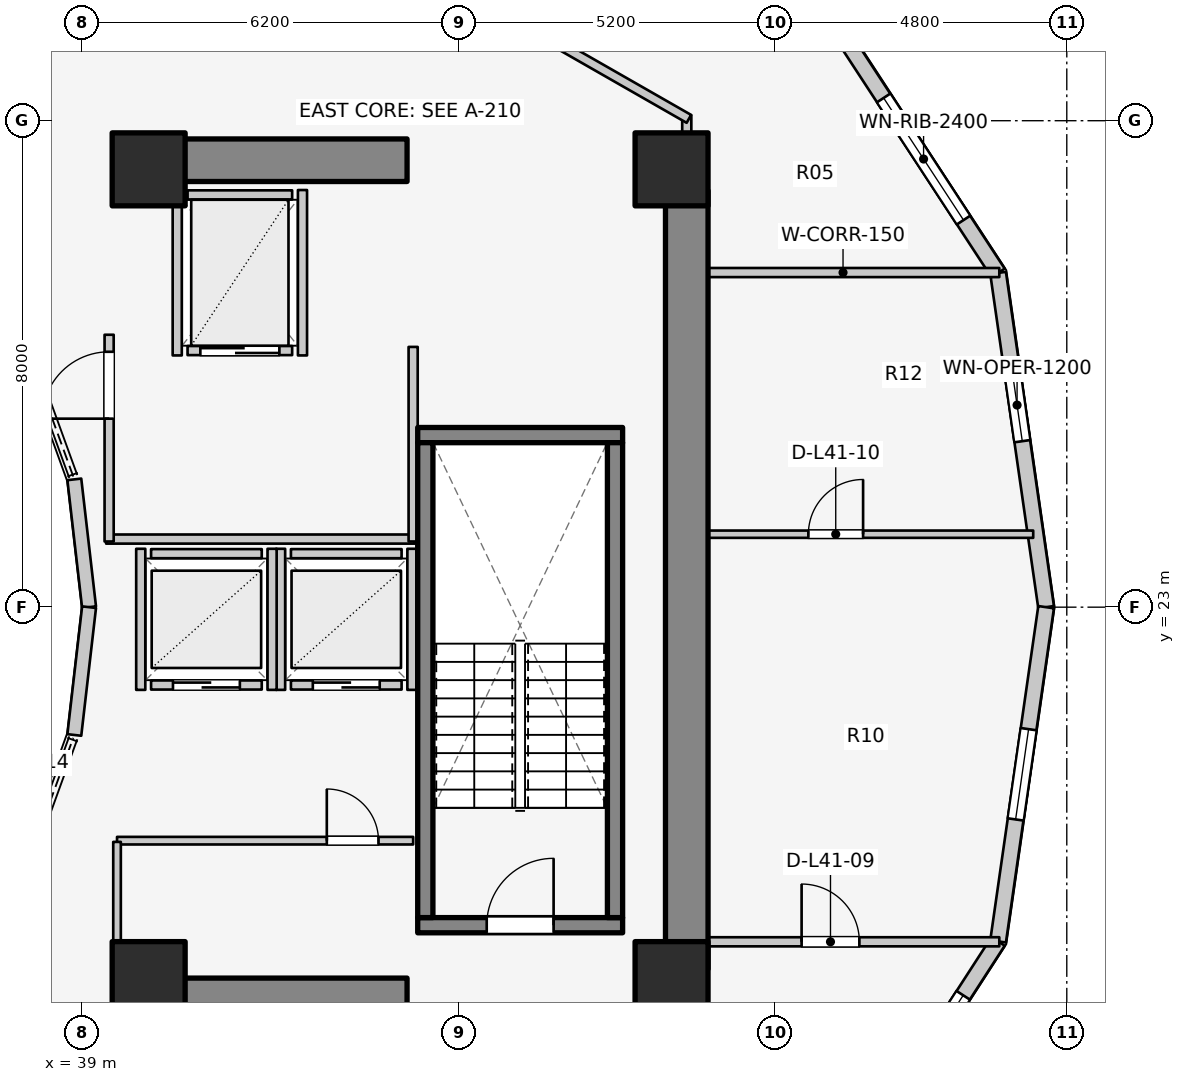
"""IFC4 building model, lengths in metres.
Left out: names, types, materials, properties, quantities, classifications, styles, units other than length and angle.
Written with IfcOpenShell. Run it as: python <this file> out.ifc"""

import sys

from ifc_helpers import new_model, si_unit, direction, frame, frame_2d, origin, origin_2d, place, context, subcontext, project, spatial, rectangle, extrude, element, fill, save


model = new_model("IFC4")
c1 = context("Model", 3, precision=1e-05, world=origin(), true_north=direction((0.0, 1.0)))
c2 = subcontext(c1, "Body", "Model", "MODEL_VIEW")
j1 = project(units=[si_unit("LENGTHUNIT", "METRE"), si_unit("PLANEANGLEUNIT", "RADIAN")], contexts=[c1])
p1 = place(None, origin())
s1 = spatial("IfcSite", under=j1, at=p1, CompositionType="ELEMENT")
p2 = place(p1, origin())
s2 = spatial("IfcBuilding", under=s1, at=p2, CompositionType="ELEMENT")
p3 = place(p2, frame((0.0, 0.0, 137.4)))
s3 = spatial("IfcBuildingStorey", under=s2, at=p3, CompositionType="ELEMENT", Elevation=137.4)
p4 = place(p3, frame((48.95, 17.05, 0.0), z_axis=(0.0, 0.0, 1.0), x_axis=(0.0, 1.0, 0.0)))
e1 = element("IfcWall", 1, at=p4, inside=s3, PredefinedType="SHEAR", context=c2, shape_type="SweptSolid", body=[
    extrude(rectangle(XDim=12.8, YDim=0.7, at=frame_2d((6.4, 0.0))), origin(), (0.0, 0.0, 1.0), 3.1),
])
for number, where, z_axis, x_axis in (
    (2, (39.85, 16.55, 0.0), (0.0, 0.0, 1.0), (1.0, 0.0, 0.0)),
    (3, (39.85, 30.35, 0.0), (0.0, 0.0, 1.0), (1.0, 0.0, 0.0)),
):
    element("IfcWall", number, at=place(p3, frame(where, z_axis=z_axis, x_axis=x_axis)), inside=s3, PredefinedType="SHEAR", context=c2, shape_type="SweptSolid", body=[
        extrude(rectangle(XDim=4.5, YDim=0.7, at=frame_2d((2.25, 0.0))), origin(), (0.0, 0.0, 1.0), 3.1),
    ])
p5 = place(p3, frame((44.525, 17.77, 0.0), z_axis=(0.0, 0.0, 1.0), x_axis=(1.0, 0.0, 0.0)))
e4 = element("IfcWall", 4, at=p5, inside=s3, PredefinedType="SOLIDWALL", context=c2, shape_type="SweptSolid", body=[
    extrude(rectangle(XDim=3.37, YDim=0.25, at=frame_2d((1.685, 0.0))), origin(), (0.0, 0.0, 1.0), 3.1),
])
p6 = place(p5, frame((1.135, 0.0, 0.0)))
e5 = element("IfcOpeningElement", 5, at=p6, cuts=e4, PredefinedType="OPENING", context=c2, shape_type="SweptSolid", body=[
    extrude(rectangle(XDim=1.1, YDim=2.1, at=frame_2d((0.55, 1.05))), frame((0.0, 0.135, 0.0), z_axis=(0.0, -1.0, 0.0), x_axis=(1.0, 0.0, 0.0)), (0.0, 0.0, 1.0), 0.27),
])
p7 = place(p3, frame((44.525, 25.83, 0.0), z_axis=(0.0, 0.0, 1.0), x_axis=(1.0, 0.0, 0.0)))
e6 = element("IfcWall", 6, at=p7, inside=s3, PredefinedType="SOLIDWALL", context=c2, shape_type="SweptSolid", body=[
    extrude(rectangle(XDim=3.37, YDim=0.25, at=frame_2d((1.685, 0.0))), origin(), (0.0, 0.0, 1.0), 3.1),
])
for number, where, z_axis, x_axis in (
    (7, (44.65, 17.895, 0.0), (0.0, 0.0, 1.0), (0.0, 1.0, 0.0)),
    (8, (47.77, 17.895, 0.0), (0.0, 0.0, 1.0), (0.0, 1.0, 0.0)),
):
    element("IfcWall", number, at=place(p3, frame(where, z_axis=z_axis, x_axis=x_axis)), inside=s3, PredefinedType="SOLIDWALL", context=c2, shape_type="SweptSolid", body=[
        extrude(rectangle(XDim=7.81, YDim=0.25, at=frame_2d((3.905, 0.0))), origin(), (0.0, 0.0, 1.0), 3.1),
    ])
for number, where, z_axis, x_axis in (
    (9, (40.1, 16.9, 0.0), (0.0, 0.0, 1.0), (1.0, 0.0, 0.0)),
    (10, (48.7, 16.9, 0.0), (0.0, 0.0, 1.0), (1.0, 0.0, 0.0)),
    (11, (48.7, 30.2, 0.0), (0.0, 0.0, 1.0), (1.0, 0.0, 0.0)),
    (12, (40.1, 30.2, 0.0), (0.0, 0.0, 1.0), (1.0, 0.0, 0.0)),
):
    element("IfcColumn", number, at=place(p3, frame(where, z_axis=z_axis, x_axis=x_axis)), inside=s3, PredefinedType="COLUMN", context=c2, shape_type="SweptSolid", body=[
        extrude(rectangle(XDim=1.2, YDim=1.2, at=origin_2d()), origin(), (0.0, 0.0, 1.0), 3.1),
    ])
for number, where, z_axis, x_axis in (
    (13, (39.12, 23.0, 0.0), (0.0, 0.0, 1.0), (-0.115, 0.993, 0.0)),
    (14, (38.877, 20.898, 0.0), (0.0, 0.0, 1.0), (0.115, 0.993, 0.0)),
):
    element("IfcWall", number, at=place(p3, frame(where, z_axis=z_axis, x_axis=x_axis)), inside=s3, PredefinedType="STANDARD", context=c2, shape_type="SweptSolid", body=[
        extrude(rectangle(XDim=2.115, YDim=0.23, at=frame_2d((1.058, 0.0))), origin(), (0.0, 0.0, 1.0), 2.84),
    ])
p8 = place(p3, frame((54.86, 23.0, 0.0), z_axis=(0.0, 0.0, 1.0), x_axis=(-0.142227632286, 0.989833976288, 0.0)))
e15 = element("IfcWall", 15, at=p8, inside=s3, PredefinedType="STANDARD", context=c2, shape_type="SweptSolid", body=[
    extrude(rectangle(XDim=5.553, YDim=0.26, at=frame_2d((2.776, 0.0))), origin(), (0.0, 0.0, 1.0), 2.85),
])
p9 = place(p8, frame((2.758, 0.0, 0.75)))
e16 = element("IfcOpeningElement", 16, at=p9, cuts=e15, PredefinedType="OPENING", context=c2, shape_type="SweptSolid", body=[
    extrude(rectangle(XDim=1.2, YDim=1.5, at=frame_2d((0.6, 0.75))), frame((0.0, 0.14, 0.0), z_axis=(0.0, -1.0, 0.0), x_axis=(1.0, 0.0, 0.0)), (0.0, 0.0, 1.0), 0.28),
])
p10 = place(p3, frame((54.07, 28.497, 0.0), z_axis=(0.0, 0.0, 1.0), x_axis=(-0.547456494366, 0.836834145322, 0.0)))
e17 = element("IfcWall", 17, at=p10, inside=s3, PredefinedType="STANDARD", context=c2, shape_type="SweptSolid", body=[
    extrude(rectangle(XDim=4.477, YDim=0.26, at=frame_2d((2.239, 0.0))), origin(), (0.0, 0.0, 1.0), 2.85),
])
p11 = place(p10, frame((1.039, 0.0, 0.75)))
e18 = element("IfcOpeningElement", 18, at=p11, cuts=e17, PredefinedType="OPENING", context=c2, shape_type="SweptSolid", body=[
    extrude(rectangle(XDim=2.4, YDim=1.7, at=frame_2d((1.2, 0.85))), frame((0.0, 0.14, 0.0), z_axis=(0.0, -1.0, 0.0), x_axis=(1.0, 0.0, 0.0)), (0.0, 0.0, 1.0), 0.28),
])
p12 = place(p3, frame((51.619, 13.716, 0.0), z_axis=(0.0, 0.0, 1.0), x_axis=(0.543358984534, 0.839500454989, 0.0)))
e19 = element("IfcWall", 19, at=p12, inside=s3, PredefinedType="STANDARD", context=c2, shape_type="SweptSolid", body=[
    extrude(rectangle(XDim=4.511, YDim=0.26, at=frame_2d((2.256, 0.0))), origin(), (0.0, 0.0, 1.0), 2.85),
])
p13 = place(p12, frame((1.056, 0.0, 0.75)))
e20 = element("IfcOpeningElement", 20, at=p13, cuts=e19, PredefinedType="OPENING", context=c2, shape_type="SweptSolid", body=[
    extrude(rectangle(XDim=2.4, YDim=1.7, at=frame_2d((1.2, 0.85))), frame((0.0, 0.14, 0.0), z_axis=(0.0, -1.0, 0.0), x_axis=(1.0, 0.0, 0.0)), (0.0, 0.0, 1.0), 0.28),
])
p14 = place(p3, frame((54.07, 17.503, 0.0), z_axis=(0.0, 0.0, 1.0), x_axis=(0.142227632286, 0.989833976288, 0.0)))
e21 = element("IfcWall", 21, at=p14, inside=s3, PredefinedType="STANDARD", context=c2, shape_type="SweptSolid", body=[
    extrude(rectangle(XDim=5.553, YDim=0.26, at=frame_2d((2.776, 0.0))), origin(), (0.0, 0.0, 1.0), 2.85),
])
p15 = place(p14, frame((2.027, 0.0, 0.75)))
e22 = element("IfcOpeningElement", 22, at=p15, cuts=e21, PredefinedType="OPENING", context=c2, shape_type="SweptSolid", body=[
    extrude(rectangle(XDim=1.5, YDim=1.6, at=frame_2d((0.75, 0.8))), frame((0.0, 0.14, 0.0), z_axis=(0.0, -1.0, 0.0), x_axis=(1.0, 0.0, 0.0)), (0.0, 0.0, 1.0), 0.28),
])
p16 = place(p3, frame((42.44, 21.72, 0.0), z_axis=(0.0, 0.0, 1.0), x_axis=(1.0, 0.0, 0.0)))
e23 = element("IfcWall", 23, at=p16, inside=s3, PredefinedType="SOLIDWALL", context=c2, shape_type="SweptSolid", body=[
    extrude(rectangle(XDim=1.82, YDim=0.15, at=frame_2d((0.91, 0.0))), origin(), (0.0, 0.0, 1.0), 2.855),
])
p17 = place(p16, frame((0.36, 0.0, 0.0)))
e24 = element("IfcOpeningElement", 24, at=p17, cuts=e23, PredefinedType="OPENING", context=c2, shape_type="SweptSolid", body=[
    extrude(rectangle(XDim=1.1, YDim=2.1, at=frame_2d((0.55, 1.05))), frame((0.0, 0.085, 0.0), z_axis=(0.0, -1.0, 0.0), x_axis=(1.0, 0.0, 0.0)), (0.0, 0.0, 1.0), 0.17),
])
p18 = place(p3, frame((42.44, 23.88, 0.0), z_axis=(0.0, 0.0, 1.0), x_axis=(1.0, 0.0, 0.0)))
e25 = element("IfcWall", 25, at=p18, inside=s3, PredefinedType="SOLIDWALL", context=c2, shape_type="SweptSolid", body=[
    extrude(rectangle(XDim=1.82, YDim=0.15, at=frame_2d((0.91, 0.0))), origin(), (0.0, 0.0, 1.0), 2.855),
])
for number, where, z_axis, x_axis in (
    (26, (42.27, 21.64, 0.0), (0.0, 0.0, 1.0), (0.0, 1.0, 0.0)),
    (27, (44.43, 21.64, 0.0), (0.0, 0.0, 1.0), (0.0, 1.0, 0.0)),
):
    element("IfcWall", number, at=place(p3, frame(where, z_axis=z_axis, x_axis=x_axis)), inside=s3, PredefinedType="SOLIDWALL", context=c2, shape_type="SweptSolid", body=[
        extrude(rectangle(XDim=2.32, YDim=0.15, at=frame_2d((1.16, 0.0))), origin(), (0.0, 0.0, 1.0), 2.855),
    ])
p19 = place(p3, frame((40.14, 21.72, 0.0), z_axis=(0.0, 0.0, 1.0), x_axis=(1.0, 0.0, 0.0)))
e28 = element("IfcWall", 28, at=p19, inside=s3, PredefinedType="SOLIDWALL", context=c2, shape_type="SweptSolid", body=[
    extrude(rectangle(XDim=1.82, YDim=0.15, at=frame_2d((0.91, 0.0))), origin(), (0.0, 0.0, 1.0), 2.12),
])
p20 = place(p19, frame((0.36, 0.0, 0.0)))
e29 = element("IfcOpeningElement", 29, at=p20, cuts=e28, PredefinedType="OPENING", context=c2, shape_type="SweptSolid", body=[
    extrude(rectangle(XDim=1.1, YDim=2.1, at=frame_2d((0.55, 1.05))), frame((0.0, 0.085, 0.0), z_axis=(0.0, -1.0, 0.0), x_axis=(1.0, 0.0, 0.0)), (0.0, 0.0, 1.0), 0.17),
])
p21 = place(p3, frame((40.14, 23.88, 0.0), z_axis=(0.0, 0.0, 1.0), x_axis=(1.0, 0.0, 0.0)))
e30 = element("IfcWall", 30, at=p21, inside=s3, PredefinedType="SOLIDWALL", context=c2, shape_type="SweptSolid", body=[
    extrude(rectangle(XDim=1.82, YDim=0.15, at=frame_2d((0.91, 0.0))), origin(), (0.0, 0.0, 1.0), 2.12),
])
p22 = place(p3, frame((39.97, 21.64, 0.0), z_axis=(0.0, 0.0, 1.0), x_axis=(0.0, 1.0, 0.0)))
e31 = element("IfcWall", 31, at=p22, inside=s3, PredefinedType="SOLIDWALL", context=c2, shape_type="SweptSolid", body=[
    extrude(rectangle(XDim=2.32, YDim=0.15, at=frame_2d((1.16, 0.0))), origin(), (0.0, 0.0, 1.0), 2.12),
])
p23 = place(p3, frame((42.13, 21.64, 0.0), z_axis=(0.0, 0.0, 1.0), x_axis=(0.0, 1.0, 0.0)))
e32 = element("IfcWall", 32, at=p23, inside=s3, PredefinedType="SOLIDWALL", context=c2, shape_type="SweptSolid", body=[
    extrude(rectangle(XDim=2.32, YDim=0.15, at=frame_2d((1.16, 0.0))), origin(), (0.0, 0.0, 1.0), 2.855),
])
p24 = place(p3, frame((40.74, 27.22, 0.0), z_axis=(0.0, 0.0, 1.0), x_axis=(1.0, 0.0, 0.0)))
e33 = element("IfcWall", 33, at=p24, inside=s3, PredefinedType="SOLIDWALL", context=c2, shape_type="SweptSolid", body=[
    extrude(rectangle(XDim=1.72, YDim=0.15, at=frame_2d((0.86, 0.0))), origin(), (0.0, 0.0, 1.0), 2.855),
])
p25 = place(p24, frame((0.21, 0.0, 0.0)))
e34 = element("IfcOpeningElement", 34, at=p25, cuts=e33, PredefinedType="OPENING", context=c2, shape_type="SweptSolid", body=[
    extrude(rectangle(XDim=1.3, YDim=2.1, at=frame_2d((0.65, 1.05))), frame((0.0, 0.085, 0.0), z_axis=(0.0, -1.0, 0.0), x_axis=(1.0, 0.0, 0.0)), (0.0, 0.0, 1.0), 0.17),
])
p26 = place(p3, frame((40.74, 29.78, 0.0), z_axis=(0.0, 0.0, 1.0), x_axis=(1.0, 0.0, 0.0)))
e35 = element("IfcWall", 35, at=p26, inside=s3, PredefinedType="SOLIDWALL", context=c2, shape_type="SweptSolid", body=[
    extrude(rectangle(XDim=1.72, YDim=0.15, at=frame_2d((0.86, 0.0))), origin(), (0.0, 0.0, 1.0), 2.855),
])
for number, where, z_axis, x_axis in (
    (36, (40.57, 27.14, 0.0), (0.0, 0.0, 1.0), (0.0, 1.0, 0.0)),
    (37, (42.63, 27.14, 0.0), (0.0, 0.0, 1.0), (0.0, 1.0, 0.0)),
):
    element("IfcWall", number, at=place(p3, frame(where, z_axis=z_axis, x_axis=x_axis)), inside=s3, PredefinedType="SOLIDWALL", context=c2, shape_type="SweptSolid", body=[
        extrude(rectangle(XDim=2.72, YDim=0.15, at=frame_2d((1.36, 0.0))), origin(), (0.0, 0.0, 1.0), 2.855),
    ])
p27 = place(p3, frame((39.4, 24.12, 0.0), z_axis=(0.0, 0.0, 1.0), x_axis=(1.0, 0.0, 0.0)))
e38 = element("IfcWall", 38, at=p27, inside=s3, PredefinedType="PARTITIONING", context=c2, shape_type="SweptSolid", body=[
    extrude(rectangle(XDim=5.08, YDim=0.15, at=frame_2d((2.54, 0.0))), origin(), (0.0, 0.0, 1.0), 2.12),
])
p28 = place(p3, frame((44.45, 24.08, 0.0), z_axis=(0.0, 0.0, 1.0), x_axis=(0.0, 1.0, 0.0)))
e39 = element("IfcWall", 39, at=p28, inside=s3, PredefinedType="PARTITIONING", context=c2, shape_type="SweptSolid", body=[
    extrude(rectangle(XDim=3.2, YDim=0.15, at=frame_2d((1.6, 0.0))), origin(), (0.0, 0.0, 1.0), 2.855),
])
p29 = place(p3, frame((39.45, 24.08, 0.0), z_axis=(0.0, 0.0, 1.0), x_axis=(0.0, 1.0, 0.0)))
e40 = element("IfcWall", 40, at=p29, inside=s3, PredefinedType="PARTITIONING", context=c2, shape_type="SweptSolid", body=[
    extrude(rectangle(XDim=3.4, YDim=0.15, at=frame_2d((1.7, 0.0))), origin(), (0.0, 0.0, 1.0), 2.855),
])
p30 = place(p29, frame((2.02, 0.0, 0.0)))
e41 = element("IfcOpeningElement", 41, at=p30, cuts=e40, PredefinedType="OPENING", context=c2, shape_type="SweptSolid", body=[
    extrude(rectangle(XDim=1.1, YDim=2.1, at=frame_2d((0.55, 1.05))), frame((0.0, 0.085, 0.0), z_axis=(0.0, -1.0, 0.0), x_axis=(1.0, 0.0, 0.0)), (0.0, 0.0, 1.0), 0.17),
])
p31 = place(p3, frame((39.58, 19.16, 0.0), z_axis=(0.0, 0.0, 1.0), x_axis=(1.0, 0.0, 0.0)))
e42 = element("IfcWall", 42, at=p31, inside=s3, PredefinedType="PARTITIONING", context=c2, shape_type="SweptSolid", body=[
    extrude(rectangle(XDim=4.87, YDim=0.125, at=frame_2d((2.435, 0.0))), origin(), (0.0, 0.0, 1.0), 2.12),
])
p32 = place(p31, frame((3.45, 0.0, 0.0)))
e43 = element("IfcOpeningElement", 43, at=p32, cuts=e42, PredefinedType="OPENING", context=c2, shape_type="SweptSolid", body=[
    extrude(rectangle(XDim=0.85, YDim=2.05, at=frame_2d((0.425, 1.025))), frame((0.0, 0.073, 0.0), z_axis=(0.0, -1.0, 0.0), x_axis=(1.0, 0.0, 0.0)), (0.0, 0.0, 1.0), 0.145),
])
p33 = place(p3, frame((39.58, 17.1, 0.0), z_axis=(0.0, 0.0, 1.0), x_axis=(0.0, 1.0, 0.0)))
e44 = element("IfcWall", 44, at=p33, inside=s3, PredefinedType="PARTITIONING", context=c2, shape_type="SweptSolid", body=[
    extrude(rectangle(XDim=2.04, YDim=0.125, at=frame_2d((1.02, 0.0))), origin(), (0.0, 0.0, 1.0), 2.232),
])
p34 = place(p3, frame((48.95, 17.497, 0.0), z_axis=(0.0, 0.0, 1.0), x_axis=(1.0, 0.0, 0.0)))
e45 = element("IfcWall", 45, at=p34, inside=s3, PredefinedType="PARTITIONING", context=c2, shape_type="SweptSolid", body=[
    extrude(rectangle(XDim=5.14, YDim=0.15, at=frame_2d((2.57, 0.0))), origin(), (0.0, 0.0, 1.0), 2.855),
])
p35 = place(p34, frame((1.889, 0.0, 0.0)))
e46 = element("IfcOpeningElement", 46, at=p35, cuts=e45, PredefinedType="OPENING", context=c2, shape_type="SweptSolid", body=[
    extrude(rectangle(XDim=0.95, YDim=2.1, at=frame_2d((0.475, 1.05))), frame((0.0, 0.085, 0.0), z_axis=(0.0, -1.0, 0.0), x_axis=(1.0, 0.0, 0.0)), (0.0, 0.0, 1.0), 0.17),
])
p36 = place(p3, frame((48.95, 28.503, 0.0), z_axis=(0.0, 0.0, 1.0), x_axis=(1.0, 0.0, 0.0)))
e47 = element("IfcWall", 47, at=p36, inside=s3, PredefinedType="PARTITIONING", context=c2, shape_type="SweptSolid", body=[
    extrude(rectangle(XDim=5.14, YDim=0.15, at=frame_2d((2.57, 0.0))), origin(), (0.0, 0.0, 1.0), 2.855),
])
p37 = place(p3, frame((48.95, 24.2, 0.0), z_axis=(0.0, 0.0, 1.0), x_axis=(1.0, 0.0, 0.0)))
e48 = element("IfcWall", 48, at=p37, inside=s3, PredefinedType="MOVABLE", context=c2, shape_type="SweptSolid", body=[
    extrude(rectangle(XDim=5.698, YDim=0.12, at=frame_2d((2.849, 0.0))), origin(), (0.0, 0.0, 1.0), 2.855),
])
p38 = place(p37, frame((2.0, 0.0, 0.0)))
e49 = element("IfcOpeningElement", 49, at=p38, cuts=e48, PredefinedType="OPENING", context=c2, shape_type="SweptSolid", body=[
    extrude(rectangle(XDim=0.9, YDim=2.1, at=frame_2d((0.45, 1.05))), frame((0.0, 0.07, 0.0), z_axis=(0.0, -1.0, 0.0), x_axis=(1.0, 0.0, 0.0)), (0.0, 0.0, 1.0), 0.14),
])
p39 = place(p3, frame((48.95, 29.8, 0.0), z_axis=(0.0, 0.0, 1.0), x_axis=(0.0, 1.0, 0.0)))
e50 = element("IfcWall", 50, at=p39, inside=s3, PredefinedType="PARTITIONING", context=c2, shape_type="SweptSolid", body=[
    extrude(rectangle(XDim=1.29, YDim=0.15, at=frame_2d((0.645, 0.0))), origin(), (0.0, 0.0, 1.0), 2.855),
])
p40 = place(p3, frame((46.757, 32.305, 0.0), z_axis=(0.0, 0.0, 1.0), x_axis=(0.867991349648, -0.496579315857, 0.0)))
e51 = element("IfcWall", 51, at=p40, inside=s3, PredefinedType="PARTITIONING", context=c2, shape_type="SweptSolid", body=[
    extrude(rectangle(XDim=2.567, YDim=0.15, at=frame_2d((1.283, 0.0))), origin(), (0.0, 0.0, 1.0), 2.22),
])
p41 = place(p9, origin())
e52 = element("IfcWindow", 52, at=p41, inside=s3, PartitioningType="SINGLE_PANEL", PredefinedType="WINDOW", context=c2, shape_type="SweptSolid", body=[
    extrude(rectangle(XDim=1.2, YDim=1.5, at=frame_2d((0.6, 0.75))), frame((0.0, 0.03, 0.0), z_axis=(0.0, -1.0, 0.0), x_axis=(1.0, 0.0, 0.0)), (0.0, 0.0, 1.0), 0.06),
])
fill(e16, e52)
p42 = place(p11, origin())
e53 = element("IfcWindow", 53, at=p42, inside=s3, PartitioningType="SINGLE_PANEL", PredefinedType="WINDOW", context=c2, shape_type="SweptSolid", body=[
    extrude(rectangle(XDim=2.4, YDim=1.7, at=frame_2d((1.2, 0.85))), frame((0.0, 0.03, 0.0), z_axis=(0.0, -1.0, 0.0), x_axis=(1.0, 0.0, 0.0)), (0.0, 0.0, 1.0), 0.06),
])
fill(e18, e53)
p43 = place(p13, origin())
e54 = element("IfcWindow", 54, at=p43, inside=s3, PartitioningType="SINGLE_PANEL", PredefinedType="WINDOW", context=c2, shape_type="SweptSolid", body=[
    extrude(rectangle(XDim=2.4, YDim=1.7, at=frame_2d((1.2, 0.85))), frame((0.0, 0.03, 0.0), z_axis=(0.0, -1.0, 0.0), x_axis=(1.0, 0.0, 0.0)), (0.0, 0.0, 1.0), 0.06),
])
fill(e20, e54)
p44 = place(p15, origin())
e55 = element("IfcWindow", 55, at=p44, inside=s3, PartitioningType="SINGLE_PANEL", PredefinedType="WINDOW", context=c2, shape_type="SweptSolid", body=[
    extrude(rectangle(XDim=1.5, YDim=1.6, at=frame_2d((0.75, 0.8))), frame((0.0, 0.03, 0.0), z_axis=(0.0, -1.0, 0.0), x_axis=(1.0, 0.0, 0.0)), (0.0, 0.0, 1.0), 0.06),
])
fill(e22, e55)
p45 = place(p6, origin())
e56 = element("IfcDoor", 56, at=p45, inside=s3, OperationType="SINGLE_SWING_RIGHT", PredefinedType="DOOR", context=c2, shape_type="SweptSolid", body=[
    extrude(rectangle(XDim=1.1, YDim=2.1, at=frame_2d((0.55, 1.05))), frame((0.0, 0.025, 0.0), z_axis=(0.0, -1.0, 0.0), x_axis=(1.0, 0.0, 0.0)), (0.0, 0.0, 1.0), 0.05),
])
fill(e5, e56)
p46 = place(p17, origin())
e57 = element("IfcDoor", 57, at=p46, inside=s3, OperationType="DOUBLE_DOOR_SLIDING", PredefinedType="DOOR", context=c2, shape_type="SweptSolid", body=[
    extrude(rectangle(XDim=1.1, YDim=2.1, at=frame_2d((0.55, 1.05))), frame((0.0, 0.025, 0.0), z_axis=(0.0, -1.0, 0.0), x_axis=(1.0, 0.0, 0.0)), (0.0, 0.0, 1.0), 0.05),
])
fill(e24, e57)
p47 = place(p20, origin())
e58 = element("IfcDoor", 58, at=p47, inside=s3, OperationType="DOUBLE_DOOR_SLIDING", PredefinedType="DOOR", context=c2, shape_type="SweptSolid", body=[
    extrude(rectangle(XDim=1.1, YDim=2.1, at=frame_2d((0.55, 1.05))), frame((0.0, 0.025, 0.0), z_axis=(0.0, -1.0, 0.0), x_axis=(1.0, 0.0, 0.0)), (0.0, 0.0, 1.0), 0.05),
])
fill(e29, e58)
p48 = place(p25, origin())
e59 = element("IfcDoor", 59, at=p48, inside=s3, OperationType="DOUBLE_DOOR_SLIDING", PredefinedType="DOOR", context=c2, shape_type="SweptSolid", body=[
    extrude(rectangle(XDim=1.3, YDim=2.1, at=frame_2d((0.65, 1.05))), frame((0.0, 0.025, 0.0), z_axis=(0.0, -1.0, 0.0), x_axis=(1.0, 0.0, 0.0)), (0.0, 0.0, 1.0), 0.05),
])
fill(e34, e59)
p49 = place(p30, origin())
e60 = element("IfcDoor", 60, at=p49, inside=s3, OperationType="SINGLE_SWING_LEFT", PredefinedType="DOOR", context=c2, shape_type="SweptSolid", body=[
    extrude(rectangle(XDim=1.1, YDim=2.1, at=frame_2d((0.55, 1.05))), frame((0.0, 0.025, 0.0), z_axis=(0.0, -1.0, 0.0), x_axis=(1.0, 0.0, 0.0)), (0.0, 0.0, 1.0), 0.05),
])
fill(e41, e60)
p50 = place(p32, origin())
e61 = element("IfcDoor", 61, at=p50, inside=s3, OperationType="SINGLE_SWING_LEFT", PredefinedType="DOOR", context=c2, shape_type="SweptSolid", body=[
    extrude(rectangle(XDim=0.85, YDim=2.05, at=frame_2d((0.425, 1.025))), frame((0.0, 0.025, 0.0), z_axis=(0.0, -1.0, 0.0), x_axis=(1.0, 0.0, 0.0)), (0.0, 0.0, 1.0), 0.05),
])
fill(e43, e61)
p51 = place(p35, origin())
e62 = element("IfcDoor", 62, at=p51, inside=s3, OperationType="SINGLE_SWING_LEFT", PredefinedType="DOOR", context=c2, shape_type="SweptSolid", body=[
    extrude(rectangle(XDim=0.95, YDim=2.1, at=frame_2d((0.475, 1.05))), frame((0.0, 0.025, 0.0), z_axis=(0.0, -1.0, 0.0), x_axis=(1.0, 0.0, 0.0)), (0.0, 0.0, 1.0), 0.05),
])
fill(e46, e62)
p52 = place(p38, origin())
e63 = element("IfcDoor", 63, at=p52, inside=s3, OperationType="SINGLE_SWING_RIGHT", PredefinedType="DOOR", context=c2, shape_type="SweptSolid", body=[
    extrude(rectangle(XDim=0.9, YDim=2.1, at=frame_2d((0.45, 1.05))), frame((0.0, 0.025, 0.0), z_axis=(0.0, -1.0, 0.0), x_axis=(1.0, 0.0, 0.0)), (0.0, 0.0, 1.0), 0.05),
])
fill(e49, e63)
save(model, sys.argv[1])
